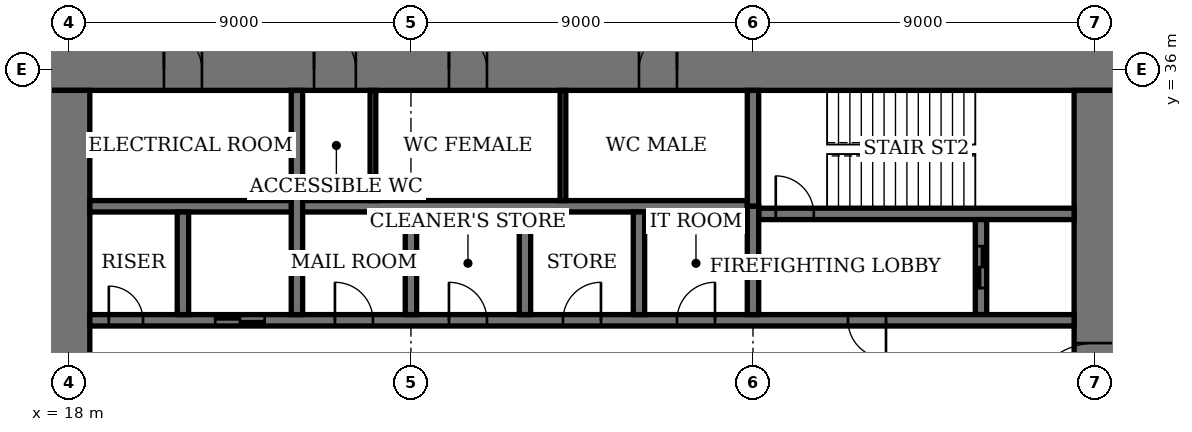
"""IFC4 building model, lengths in metres.
Left out: names, types, materials, properties, quantities, classifications, styles, units other than length and angle.
Written with IfcOpenShell. Run it as: python <this file> out.ifc"""

import sys

from ifc_helpers import new_model, si_unit, direction, frame, frame_2d, origin, place, context, subcontext, project, spatial, rectangle, extrude, element, fill, save


model = new_model("IFC4")
c1 = context("Model", 3, precision=1e-05, world=origin(), true_north=direction((0.0, 1.0)))
c2 = subcontext(c1, "Body", "Model", "MODEL_VIEW")
j1 = project(units=[si_unit("LENGTHUNIT", "METRE"), si_unit("PLANEANGLEUNIT", "RADIAN")], contexts=[c1])
p1 = place(None, origin())
s1 = spatial("IfcSite", under=j1, at=p1, CompositionType="ELEMENT")
p2 = place(p1, origin())
s2 = spatial("IfcBuilding", under=s1, at=p2, CompositionType="ELEMENT")
p3 = place(p2, frame((0.0, 0.0, 295.4)))
s3 = spatial("IfcBuildingStorey", under=s2, at=p3, CompositionType="ELEMENT", Elevation=295.4)
p4 = place(p3, frame((45.55, 36.0, 0.0), z_axis=(0.0, 0.0, 1.0), x_axis=(-1.0, 0.0, 0.0)))
e1 = element("IfcWall", 1, at=p4, inside=s3, PredefinedType="SHEAR", context=c2, shape_type="SweptSolid", body=[
    extrude(rectangle(XDim=28.1, YDim=1.1, at=frame_2d((14.05, 0.0))), origin(), (0.0, 0.0, 1.0), 4.0),
])
p5 = place(p4, frame((11.55, 0.0, 0.0)))
e2 = element("IfcOpeningElement", 2, at=p5, cuts=e1, PredefinedType="OPENING", context=c2, shape_type="SweptSolid", body=[
    extrude(rectangle(XDim=1.0, YDim=2.4, at=frame_2d((0.5, 1.2))), frame((0.0, 0.56, 0.0), z_axis=(0.0, -1.0, 0.0), x_axis=(1.0, 0.0, 0.0)), (0.0, 0.0, 1.0), 1.12),
])
p6 = place(p4, frame((16.55, 0.0, 0.0)))
e3 = element("IfcOpeningElement", 3, at=p6, cuts=e1, PredefinedType="OPENING", context=c2, shape_type="SweptSolid", body=[
    extrude(rectangle(XDim=1.0, YDim=2.4, at=frame_2d((0.5, 1.2))), frame((0.0, 0.56, 0.0), z_axis=(0.0, -1.0, 0.0), x_axis=(1.0, 0.0, 0.0)), (0.0, 0.0, 1.0), 1.12),
])
p7 = place(p4, frame((20.0, 0.0, 0.0)))
e4 = element("IfcOpeningElement", 4, at=p7, cuts=e1, PredefinedType="OPENING", context=c2, shape_type="SweptSolid", body=[
    extrude(rectangle(XDim=1.1, YDim=2.4, at=frame_2d((0.55, 1.2))), frame((0.0, 0.56, 0.0), z_axis=(0.0, -1.0, 0.0), x_axis=(1.0, 0.0, 0.0)), (0.0, 0.0, 1.0), 1.12),
])
p8 = place(p4, frame((24.05, 0.0, 0.0)))
e5 = element("IfcOpeningElement", 5, at=p8, cuts=e1, PredefinedType="OPENING", context=c2, shape_type="SweptSolid", body=[
    extrude(rectangle(XDim=1.0, YDim=2.4, at=frame_2d((0.5, 1.2))), frame((0.0, 0.56, 0.0), z_axis=(0.0, -1.0, 0.0), x_axis=(1.0, 0.0, 0.0)), (0.0, 0.0, 1.0), 1.12),
])
p9 = place(p3, frame((18.0, 35.45, 0.0), z_axis=(0.0, 0.0, 1.0), x_axis=(0.0, -1.0, 0.0)))
e6 = element("IfcWall", 6, at=p9, inside=s3, PredefinedType="SHEAR", context=c2, shape_type="SweptSolid", body=[
    extrude(rectangle(XDim=16.9, YDim=1.1, at=frame_2d((8.45, 0.0))), origin(), (0.0, 0.0, 1.0), 4.0),
])
p10 = place(p9, frame((8.45, 0.0, 0.0)))
e7 = element("IfcOpeningElement", 7, at=p10, cuts=e6, PredefinedType="OPENING", context=c2, shape_type="SweptSolid", body=[
    extrude(rectangle(XDim=1.8, YDim=2.4, at=frame_2d((0.9, 1.2))), frame((0.0, 0.56, 0.0), z_axis=(0.0, -1.0, 0.0), x_axis=(1.0, 0.0, 0.0)), (0.0, 0.0, 1.0), 1.12),
])
p11 = place(p3, frame((45.0, 18.55, 0.0), z_axis=(0.0, 0.0, 1.0), x_axis=(0.0, 1.0, 0.0)))
e8 = element("IfcWall", 8, at=p11, inside=s3, PredefinedType="SHEAR", context=c2, shape_type="SweptSolid", body=[
    extrude(rectangle(XDim=16.9, YDim=1.1, at=frame_2d((8.45, 0.0))), origin(), (0.0, 0.0, 1.0), 4.0),
])
p12 = place(p11, frame((8.45, 0.0, 0.0)))
e9 = element("IfcOpeningElement", 9, at=p12, cuts=e8, PredefinedType="OPENING", context=c2, shape_type="SweptSolid", body=[
    extrude(rectangle(XDim=1.8, YDim=2.4, at=frame_2d((0.9, 1.2))), frame((0.0, 0.56, 0.0), z_axis=(0.0, -1.0, 0.0), x_axis=(1.0, 0.0, 0.0)), (0.0, 0.0, 1.0), 1.12),
])
p13 = place(p3, frame((36.15, 32.2, 0.0), z_axis=(0.0, 0.0, 1.0), x_axis=(1.0, 0.0, 0.0)))
e10 = element("IfcWall", 10, at=p13, inside=s3, PredefinedType="SHEAR", context=c2, shape_type="SweptSolid", body=[
    extrude(rectangle(XDim=8.3, YDim=0.3, at=frame_2d((4.15, 0.0))), origin(), (0.0, 0.0, 1.0), 4.0),
])
p14 = place(p13, frame((0.45, 0.0, 0.0)))
e11 = element("IfcOpeningElement", 11, at=p14, cuts=e10, PredefinedType="OPENING", context=c2, shape_type="SweptSolid", body=[
    extrude(rectangle(XDim=1.0, YDim=2.4, at=frame_2d((0.5, 1.2))), frame((0.0, 0.16, 0.0), z_axis=(0.0, -1.0, 0.0), x_axis=(1.0, 0.0, 0.0)), (0.0, 0.0, 1.0), 0.32),
])
p15 = place(p3, frame((36.0, 32.4, 0.0), z_axis=(0.0, 0.0, 1.0), x_axis=(0.0, 1.0, 0.0)))
e12 = element("IfcWall", 12, at=p15, inside=s3, PredefinedType="SHEAR", context=c2, shape_type="SweptSolid", body=[
    extrude(rectangle(XDim=3.05, YDim=0.3, at=frame_2d((1.525, 0.0))), origin(), (0.0, 0.0, 1.0), 4.0),
])
p16 = place(p3, frame((42.0, 29.55, 0.0), z_axis=(0.0, 0.0, 1.0), x_axis=(0.0, 1.0, 0.0)))
e13 = element("IfcWall", 13, at=p16, inside=s3, PredefinedType="SHEAR", context=c2, shape_type="SweptSolid", body=[
    extrude(rectangle(XDim=2.5, YDim=0.3, at=frame_2d((1.25, 0.0))), origin(), (0.0, 0.0, 1.0), 4.0),
])
p17 = place(p16, frame((0.7, 0.0, 0.0)))
e14 = element("IfcOpeningElement", 14, at=p17, cuts=e13, PredefinedType="OPENING", context=c2, shape_type="SweptSolid", body=[
    extrude(rectangle(XDim=1.1, YDim=2.4, at=frame_2d((0.55, 1.2))), frame((0.0, 0.16, 0.0), z_axis=(0.0, -1.0, 0.0), x_axis=(1.0, 0.0, 0.0)), (0.0, 0.0, 1.0), 0.32),
])
p18 = place(p3, frame((18.55, 29.4, 0.0), z_axis=(0.0, 0.0, 1.0), x_axis=(1.0, 0.0, 0.0)))
e15 = element("IfcWall", 15, at=p18, inside=s3, PredefinedType="SHEAR", context=c2, shape_type="SweptSolid", body=[
    extrude(rectangle(XDim=25.9, YDim=0.3, at=frame_2d((12.95, 0.0))), origin(), (0.0, 0.0, 1.0), 4.0),
])
p19 = place(p18, frame((19.95, 0.0, 0.0)))
e16 = element("IfcOpeningElement", 16, at=p19, cuts=e15, PredefinedType="OPENING", context=c2, shape_type="SweptSolid", body=[
    extrude(rectangle(XDim=1.0, YDim=2.4, at=frame_2d((0.5, 1.2))), frame((0.0, 0.16, 0.0), z_axis=(0.0, -1.0, 0.0), x_axis=(1.0, 0.0, 0.0)), (0.0, 0.0, 1.0), 0.32),
])
p20 = place(p18, frame((0.5, 0.0, 0.0)))
e17 = element("IfcOpeningElement", 17, at=p20, cuts=e15, PredefinedType="OPENING", context=c2, shape_type="SweptSolid", body=[
    extrude(rectangle(XDim=0.9, YDim=2.1, at=frame_2d((0.45, 1.05))), frame((0.0, 0.16, 0.0), z_axis=(0.0, -1.0, 0.0), x_axis=(1.0, 0.0, 0.0)), (0.0, 0.0, 1.0), 0.32),
])
p21 = place(p18, frame((15.45, 0.0, 0.0)))
e18 = element("IfcOpeningElement", 18, at=p21, cuts=e15, PredefinedType="OPENING", context=c2, shape_type="SweptSolid", body=[
    extrude(rectangle(XDim=1.0, YDim=2.4, at=frame_2d((0.5, 1.2))), frame((0.0, 0.16, 0.0), z_axis=(0.0, -1.0, 0.0), x_axis=(1.0, 0.0, 0.0)), (0.0, 0.0, 1.0), 0.32),
])
p22 = place(p18, frame((12.45, 0.0, 0.0)))
e19 = element("IfcOpeningElement", 19, at=p22, cuts=e15, PredefinedType="OPENING", context=c2, shape_type="SweptSolid", body=[
    extrude(rectangle(XDim=1.0, YDim=2.4, at=frame_2d((0.5, 1.2))), frame((0.0, 0.16, 0.0), z_axis=(0.0, -1.0, 0.0), x_axis=(1.0, 0.0, 0.0)), (0.0, 0.0, 1.0), 0.32),
])
p23 = place(p18, frame((9.45, 0.0, 0.0)))
e20 = element("IfcOpeningElement", 20, at=p23, cuts=e15, PredefinedType="OPENING", context=c2, shape_type="SweptSolid", body=[
    extrude(rectangle(XDim=1.0, YDim=2.4, at=frame_2d((0.5, 1.2))), frame((0.0, 0.16, 0.0), z_axis=(0.0, -1.0, 0.0), x_axis=(1.0, 0.0, 0.0)), (0.0, 0.0, 1.0), 0.32),
])
p24 = place(p18, frame((6.45, 0.0, 0.0)))
e21 = element("IfcOpeningElement", 21, at=p24, cuts=e15, PredefinedType="OPENING", context=c2, shape_type="SweptSolid", body=[
    extrude(rectangle(XDim=1.0, YDim=2.4, at=frame_2d((0.5, 1.2))), frame((0.0, 0.16, 0.0), z_axis=(0.0, -1.0, 0.0), x_axis=(1.0, 0.0, 0.0)), (0.0, 0.0, 1.0), 0.32),
])
p25 = place(p18, frame((3.3, 0.0, 0.0)))
e22 = element("IfcOpeningElement", 22, at=p25, cuts=e15, PredefinedType="OPENING", context=c2, shape_type="SweptSolid", body=[
    extrude(rectangle(XDim=1.3, YDim=2.4, at=frame_2d((0.65, 1.2))), frame((0.0, 0.16, 0.0), z_axis=(0.0, -1.0, 0.0), x_axis=(1.0, 0.0, 0.0)), (0.0, 0.0, 1.0), 0.32),
])
p26 = place(p3, frame((18.55, 32.4, 0.0), z_axis=(0.0, 0.0, 1.0), x_axis=(1.0, 0.0, 0.0)))
e23 = element("IfcWall", 23, at=p26, inside=s3, PredefinedType="SHEAR", context=c2, shape_type="SweptSolid", body=[
    extrude(rectangle(XDim=17.3, YDim=0.3, at=frame_2d((8.65, 0.0))), origin(), (0.0, 0.0, 1.0), 4.0),
])
for number, where, z_axis, x_axis in (
    (24, (33.0, 29.55, 0.0), (0.0, 0.0, 1.0), (0.0, 1.0, 0.0)),
    (25, (30.0, 29.55, 0.0), (0.0, 0.0, 1.0), (0.0, 1.0, 0.0)),
    (26, (27.0, 29.55, 0.0), (0.0, 0.0, 1.0), (0.0, 1.0, 0.0)),
):
    element("IfcWall", number, at=place(p3, frame(where, z_axis=z_axis, x_axis=x_axis)), inside=s3, PredefinedType="SHEAR", context=c2, shape_type="SweptSolid", body=[
        extrude(rectangle(XDim=2.7, YDim=0.3, at=frame_2d((1.35, 0.0))), origin(), (0.0, 0.0, 1.0), 4.0),
    ])
p27 = place(p3, frame((24.0, 29.55, 0.0), z_axis=(0.0, 0.0, 1.0), x_axis=(0.0, 1.0, 0.0)))
e27 = element("IfcWall", 27, at=p27, inside=s3, PredefinedType="SHEAR", context=c2, shape_type="SweptSolid", body=[
    extrude(rectangle(XDim=5.9, YDim=0.3, at=frame_2d((2.95, 0.0))), origin(), (0.0, 0.0, 1.0), 4.0),
])
p28 = place(p3, frame((21.0, 29.55, 0.0), z_axis=(0.0, 0.0, 1.0), x_axis=(0.0, 1.0, 0.0)))
e28 = element("IfcWall", 28, at=p28, inside=s3, PredefinedType="SHEAR", context=c2, shape_type="SweptSolid", body=[
    extrude(rectangle(XDim=2.7, YDim=0.3, at=frame_2d((1.35, 0.0))), origin(), (0.0, 0.0, 1.0), 4.0),
])
p29 = place(p3, frame((36.0, 29.55, 0.0), z_axis=(0.0, 0.0, 1.0), x_axis=(0.0, 1.0, 0.0)))
e29 = element("IfcWall", 29, at=p29, inside=s3, PredefinedType="SHEAR", context=c2, shape_type="SweptSolid", body=[
    extrude(rectangle(XDim=2.85, YDim=0.3, at=frame_2d((1.425, 0.0))), origin(), (0.0, 0.0, 1.0), 4.0),
])
for number, where, z_axis, x_axis in (
    (30, (31.0, 32.55, 0.0), (0.0, 0.0, 1.0), (0.0, 1.0, 0.0)),
    (31, (26.0, 32.55, 0.0), (0.0, 0.0, 1.0), (0.0, 1.0, 0.0)),
):
    element("IfcWall", number, at=place(p3, frame(where, z_axis=z_axis, x_axis=x_axis)), inside=s3, PredefinedType="PARTITIONING", context=c2, shape_type="SweptSolid", body=[
        extrude(rectangle(XDim=2.9, YDim=0.15, at=frame_2d((1.45, 0.0))), origin(), (0.0, 0.0, 1.0), 3.75),
    ])
p30 = place(p12, origin())
e32 = element("IfcDoor", 32, at=p30, inside=s3, OperationType="DOUBLE_DOOR_DOUBLE_SWING", PredefinedType="DOOR", context=c2, shape_type="SweptSolid", body=[
    extrude(rectangle(XDim=1.8, YDim=2.4, at=frame_2d((0.9, 1.2))), frame((0.0, 0.03, 0.0), z_axis=(0.0, -1.0, 0.0), x_axis=(1.0, 0.0, 0.0)), (0.0, 0.0, 1.0), 0.06),
    extrude(rectangle(XDim=0.04, YDim=2.4, at=frame_2d((0.02, 1.2))), frame((0.0, 0.55, 0.0), z_axis=(0.0, -1.0, 0.0), x_axis=(1.0, 0.0, 0.0)), (0.0, 0.0, 1.0), 1.1),
    extrude(rectangle(XDim=0.04, YDim=2.4, at=frame_2d((1.78, 1.2))), frame((0.0, 0.55, 0.0), z_axis=(0.0, -1.0, 0.0), x_axis=(1.0, 0.0, 0.0)), (0.0, 0.0, 1.0), 1.1),
    extrude(rectangle(XDim=1.8, YDim=0.04, at=frame_2d((0.9, 2.38))), frame((0.0, 0.55, 0.0), z_axis=(0.0, -1.0, 0.0), x_axis=(1.0, 0.0, 0.0)), (0.0, 0.0, 1.0), 1.1),
])
fill(e9, e32)
p31 = place(p5, origin())
e33 = element("IfcDoor", 33, at=p31, inside=s3, OperationType="SINGLE_SWING_LEFT", PredefinedType="DOOR", context=c2, shape_type="SweptSolid", body=[
    extrude(rectangle(XDim=1.0, YDim=2.4, at=frame_2d((0.5, 1.2))), frame((0.0, 0.025, 0.0), z_axis=(0.0, -1.0, 0.0), x_axis=(1.0, 0.0, 0.0)), (0.0, 0.0, 1.0), 0.05),
    extrude(rectangle(XDim=0.04, YDim=2.4, at=frame_2d((0.02, 1.2))), frame((0.0, 0.4, 0.0), z_axis=(0.0, -1.0, 0.0), x_axis=(1.0, 0.0, 0.0)), (0.0, 0.0, 1.0), 0.8),
    extrude(rectangle(XDim=0.04, YDim=2.4, at=frame_2d((0.98, 1.2))), frame((0.0, 0.4, 0.0), z_axis=(0.0, -1.0, 0.0), x_axis=(1.0, 0.0, 0.0)), (0.0, 0.0, 1.0), 0.8),
    extrude(rectangle(XDim=1.0, YDim=0.04, at=frame_2d((0.5, 2.38))), frame((0.0, 0.4, 0.0), z_axis=(0.0, -1.0, 0.0), x_axis=(1.0, 0.0, 0.0)), (0.0, 0.0, 1.0), 0.8),
])
fill(e2, e33)
p32 = place(p6, origin())
e34 = element("IfcDoor", 34, at=p32, inside=s3, OperationType="SINGLE_SWING_RIGHT", PredefinedType="DOOR", context=c2, shape_type="SweptSolid", body=[
    extrude(rectangle(XDim=1.0, YDim=2.4, at=frame_2d((0.5, 1.2))), frame((0.0, 0.025, 0.0), z_axis=(0.0, -1.0, 0.0), x_axis=(1.0, 0.0, 0.0)), (0.0, 0.0, 1.0), 0.05),
    extrude(rectangle(XDim=0.04, YDim=2.4, at=frame_2d((0.02, 1.2))), frame((0.0, 0.4, 0.0), z_axis=(0.0, -1.0, 0.0), x_axis=(1.0, 0.0, 0.0)), (0.0, 0.0, 1.0), 0.8),
    extrude(rectangle(XDim=0.04, YDim=2.4, at=frame_2d((0.98, 1.2))), frame((0.0, 0.4, 0.0), z_axis=(0.0, -1.0, 0.0), x_axis=(1.0, 0.0, 0.0)), (0.0, 0.0, 1.0), 0.8),
    extrude(rectangle(XDim=1.0, YDim=0.04, at=frame_2d((0.5, 2.38))), frame((0.0, 0.4, 0.0), z_axis=(0.0, -1.0, 0.0), x_axis=(1.0, 0.0, 0.0)), (0.0, 0.0, 1.0), 0.8),
])
fill(e3, e34)
p33 = place(p7, origin())
e35 = element("IfcDoor", 35, at=p33, inside=s3, OperationType="SINGLE_SWING_RIGHT", PredefinedType="DOOR", context=c2, shape_type="SweptSolid", body=[
    extrude(rectangle(XDim=1.1, YDim=2.4, at=frame_2d((0.55, 1.2))), frame((0.0, 0.025, 0.0), z_axis=(0.0, -1.0, 0.0), x_axis=(1.0, 0.0, 0.0)), (0.0, 0.0, 1.0), 0.05),
    extrude(rectangle(XDim=0.04, YDim=2.4, at=frame_2d((0.02, 1.2))), frame((0.0, 0.44, 0.0), z_axis=(0.0, -1.0, 0.0), x_axis=(1.0, 0.0, 0.0)), (0.0, 0.0, 1.0), 0.88),
    extrude(rectangle(XDim=0.04, YDim=2.4, at=frame_2d((1.08, 1.2))), frame((0.0, 0.44, 0.0), z_axis=(0.0, -1.0, 0.0), x_axis=(1.0, 0.0, 0.0)), (0.0, 0.0, 1.0), 0.88),
    extrude(rectangle(XDim=1.1, YDim=0.04, at=frame_2d((0.55, 2.38))), frame((0.0, 0.44, 0.0), z_axis=(0.0, -1.0, 0.0), x_axis=(1.0, 0.0, 0.0)), (0.0, 0.0, 1.0), 0.88),
])
fill(e4, e35)
p34 = place(p8, origin())
e36 = element("IfcDoor", 36, at=p34, inside=s3, OperationType="SINGLE_SWING_RIGHT", PredefinedType="DOOR", context=c2, shape_type="SweptSolid", body=[
    extrude(rectangle(XDim=1.0, YDim=2.4, at=frame_2d((0.5, 1.2))), frame((0.0, 0.025, 0.0), z_axis=(0.0, -1.0, 0.0), x_axis=(1.0, 0.0, 0.0)), (0.0, 0.0, 1.0), 0.05),
    extrude(rectangle(XDim=0.04, YDim=2.4, at=frame_2d((0.02, 1.2))), frame((0.0, 0.4, 0.0), z_axis=(0.0, -1.0, 0.0), x_axis=(1.0, 0.0, 0.0)), (0.0, 0.0, 1.0), 0.8),
    extrude(rectangle(XDim=0.04, YDim=2.4, at=frame_2d((0.98, 1.2))), frame((0.0, 0.4, 0.0), z_axis=(0.0, -1.0, 0.0), x_axis=(1.0, 0.0, 0.0)), (0.0, 0.0, 1.0), 0.8),
    extrude(rectangle(XDim=1.0, YDim=0.04, at=frame_2d((0.5, 2.38))), frame((0.0, 0.4, 0.0), z_axis=(0.0, -1.0, 0.0), x_axis=(1.0, 0.0, 0.0)), (0.0, 0.0, 1.0), 0.8),
])
fill(e5, e36)
p35 = place(p14, origin())
e37 = element("IfcDoor", 37, at=p35, inside=s3, OperationType="SINGLE_SWING_RIGHT", PredefinedType="DOOR", context=c2, shape_type="SweptSolid", body=[
    extrude(rectangle(XDim=1.0, YDim=2.4, at=frame_2d((0.5, 1.2))), frame((0.0, 0.03, 0.0), z_axis=(0.0, -1.0, 0.0), x_axis=(1.0, 0.0, 0.0)), (0.0, 0.0, 1.0), 0.06),
])
fill(e11, e37)
p36 = place(p19, origin())
e38 = element("IfcDoor", 38, at=p36, inside=s3, OperationType="SINGLE_SWING_RIGHT", PredefinedType="DOOR", context=c2, shape_type="SweptSolid", body=[
    extrude(rectangle(XDim=1.0, YDim=2.4, at=frame_2d((0.5, 1.2))), frame((0.0, 0.03, 0.0), z_axis=(0.0, -1.0, 0.0), x_axis=(1.0, 0.0, 0.0)), (0.0, 0.0, 1.0), 0.06),
])
fill(e16, e38)
p37 = place(p20, origin())
e39 = element("IfcDoor", 39, at=p37, inside=s3, OperationType="SINGLE_SWING_RIGHT", PredefinedType="DOOR", context=c2, shape_type="SweptSolid", body=[
    extrude(rectangle(XDim=0.9, YDim=2.1, at=frame_2d((0.45, 1.05))), frame((0.0, 0.03, 0.0), z_axis=(0.0, -1.0, 0.0), x_axis=(1.0, 0.0, 0.0)), (0.0, 0.0, 1.0), 0.06),
])
fill(e17, e39)
p38 = place(p21, origin())
e40 = element("IfcDoor", 40, at=p38, inside=s3, OperationType="SINGLE_SWING_LEFT", PredefinedType="DOOR", context=c2, shape_type="SweptSolid", body=[
    extrude(rectangle(XDim=1.0, YDim=2.4, at=frame_2d((0.5, 1.2))), frame((0.0, 0.03, 0.0), z_axis=(0.0, -1.0, 0.0), x_axis=(1.0, 0.0, 0.0)), (0.0, 0.0, 1.0), 0.06),
])
fill(e18, e40)
p39 = place(p22, origin())
e41 = element("IfcDoor", 41, at=p39, inside=s3, OperationType="SINGLE_SWING_LEFT", PredefinedType="DOOR", context=c2, shape_type="SweptSolid", body=[
    extrude(rectangle(XDim=1.0, YDim=2.4, at=frame_2d((0.5, 1.2))), frame((0.0, 0.03, 0.0), z_axis=(0.0, -1.0, 0.0), x_axis=(1.0, 0.0, 0.0)), (0.0, 0.0, 1.0), 0.06),
])
fill(e19, e41)
p40 = place(p23, origin())
e42 = element("IfcDoor", 42, at=p40, inside=s3, OperationType="SINGLE_SWING_RIGHT", PredefinedType="DOOR", context=c2, shape_type="SweptSolid", body=[
    extrude(rectangle(XDim=1.0, YDim=2.4, at=frame_2d((0.5, 1.2))), frame((0.0, 0.03, 0.0), z_axis=(0.0, -1.0, 0.0), x_axis=(1.0, 0.0, 0.0)), (0.0, 0.0, 1.0), 0.06),
])
fill(e20, e42)
p41 = place(p24, origin())
e43 = element("IfcDoor", 43, at=p41, inside=s3, OperationType="SINGLE_SWING_RIGHT", PredefinedType="DOOR", context=c2, shape_type="SweptSolid", body=[
    extrude(rectangle(XDim=1.0, YDim=2.4, at=frame_2d((0.5, 1.2))), frame((0.0, 0.03, 0.0), z_axis=(0.0, -1.0, 0.0), x_axis=(1.0, 0.0, 0.0)), (0.0, 0.0, 1.0), 0.06),
])
fill(e21, e43)
p42 = place(p25, origin())
e44 = element("IfcDoor", 44, at=p42, inside=s3, OperationType="DOUBLE_DOOR_SLIDING", PredefinedType="DOOR", context=c2, shape_type="SweptSolid", body=[
    extrude(rectangle(XDim=1.3, YDim=2.4, at=frame_2d((0.65, 1.2))), frame((0.0, 0.02, 0.0), z_axis=(0.0, -1.0, 0.0), x_axis=(1.0, 0.0, 0.0)), (0.0, 0.0, 1.0), 0.04),
])
fill(e22, e44)
p43 = place(p17, origin())
e45 = element("IfcDoor", 45, at=p43, inside=s3, OperationType="DOUBLE_DOOR_SLIDING", PredefinedType="DOOR", context=c2, shape_type="SweptSolid", body=[
    extrude(rectangle(XDim=1.1, YDim=2.4, at=frame_2d((0.55, 1.2))), frame((0.0, 0.03, 0.0), z_axis=(0.0, -1.0, 0.0), x_axis=(1.0, 0.0, 0.0)), (0.0, 0.0, 1.0), 0.06),
])
fill(e14, e45)
save(model, sys.argv[1])
